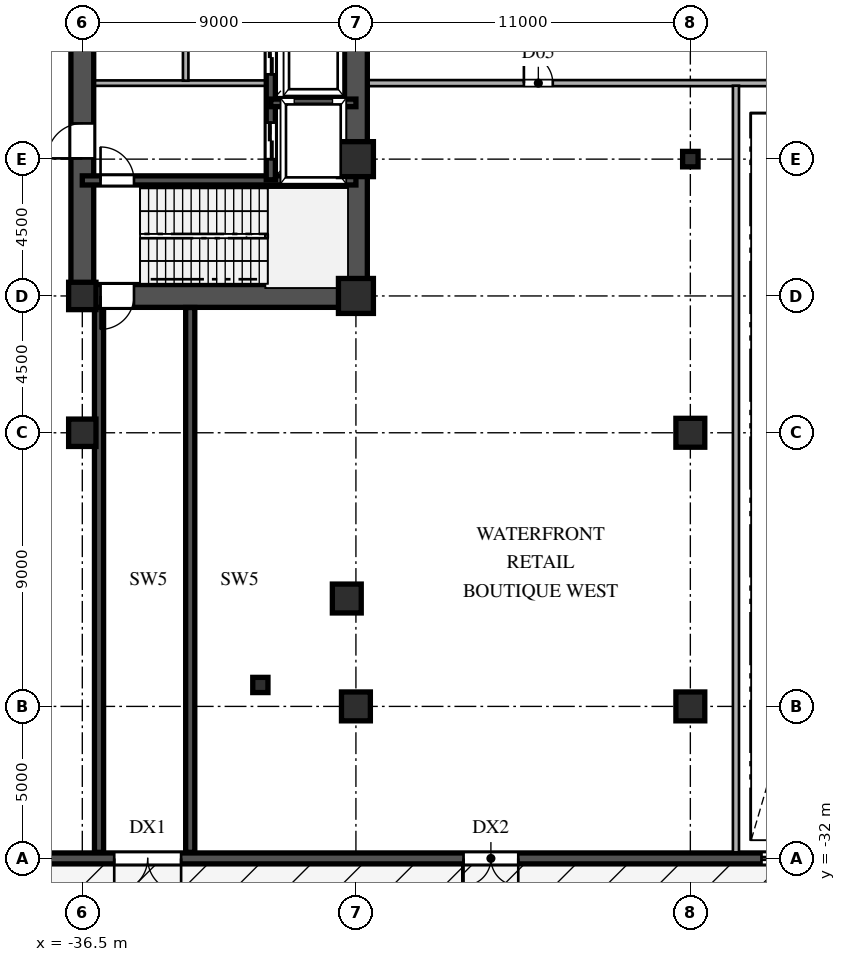
"""IFC4 building model, lengths in metres.
Left out: names, types, materials, properties, quantities, classifications, styles, units other than length and angle.
Written with IfcOpenShell. Run it as: python <this file> out.ifc"""

import sys

from ifc_helpers import new_model, si_unit, direction, frame, frame_2d, origin, origin_2d, place, context, subcontext, project, spatial, rectangle, hollow_rectangle, hollow_circle, i_section, extrude, source, transform, mapped, element, fill, save


model = new_model("IFC4")
c1 = context("Model", 3, precision=1e-05, world=origin(), true_north=direction((0.0, 1.0)))
c2 = subcontext(c1, "Body", "Model", "MODEL_VIEW")
j1 = project(units=[si_unit("LENGTHUNIT", "METRE"), si_unit("PLANEANGLEUNIT", "RADIAN")], contexts=[c1])
p1 = place(None, origin())
s1 = spatial("IfcSite", under=j1, at=p1, CompositionType="ELEMENT")
p2 = place(p1, origin())
s2 = spatial("IfcBuilding", under=s1, at=p2, CompositionType="ELEMENT")
p3 = place(p2, origin())
s3 = spatial("IfcBuildingStorey", under=s2, at=p3, CompositionType="ELEMENT", Elevation=0.0)
m1 = source(origin(), c2, "Body", "SweptSolid", [
    extrude(hollow_rectangle(XDim=1.15, YDim=1.15, WallThickness=0.048, at=origin_2d()), origin(), (0.0, 0.0, 1.0), 5.4),
])
for number, where, z_axis, x_axis in (
    (1, (-27.5, -13.5, 0.0), (0.0, 0.0, 1.0), (1.0, 0.0, 0.0)),
    (2, (-27.5, -9.0, 0.0), (0.0, 0.0, 1.0), (1.0, 0.0, 0.0)),
):
    element("IfcColumn", number, at=place(p3, frame(where, z_axis=z_axis, x_axis=x_axis)), inside=s3, PredefinedType="COLUMN", context=c2, shape_type="MappedRepresentation", body=[
        mapped(m1, transform((0.0, 0.0, 0.0), scale=1.0)),
    ])
m2 = source(origin(), c2, "Body", "SweptSolid", [
    extrude(rectangle(XDim=0.95, YDim=0.95, at=origin_2d()), origin(), (0.0, 0.0, 1.0), 5.4),
])
p4 = place(p3, frame((-27.5, -27.0, 0.0), z_axis=(0.0, 0.0, 1.0), x_axis=(1.0, 0.0, 0.0)))
e3 = element("IfcColumn", 3, at=p4, inside=s3, PredefinedType="COLUMN", context=c2, shape_type="MappedRepresentation", body=[
    mapped(m2, transform((0.0, 0.0, 0.0), scale=1.0)),
])
m3 = source(origin(), c2, "Body", "SweptSolid", [
    extrude(i_section(OverallWidth=0.9, OverallDepth=0.9, WebThickness=0.036, FlangeThickness=0.055, at=origin_2d()), origin(), (0.0, 0.0, 1.0), 5.4),
])
for number, where, z_axis, x_axis in (
    (4, (-36.5, -18.0, 0.0), (0.0, 0.0, 1.0), (1.0, 0.0, 0.0)),
    (5, (-36.5, -13.5, 0.0), (0.0, 0.0, 1.0), (1.0, 0.0, 0.0)),
):
    element("IfcColumn", number, at=place(p3, frame(where, z_axis=z_axis, x_axis=x_axis)), inside=s3, PredefinedType="COLUMN", context=c2, shape_type="MappedRepresentation", body=[
        mapped(m3, transform((0.0, 0.0, 0.0), scale=1.0)),
    ])
m4 = source(origin(), c2, "Body", "SweptSolid", [
    extrude(hollow_rectangle(XDim=0.5, YDim=0.5, WallThickness=0.02, at=origin_2d()), origin(), (0.0, 0.0, 1.0), 5.4),
])
p5 = place(p3, frame((-30.643, -26.295, 0.0), z_axis=(0.0, 0.0, 1.0), x_axis=(1.0, 0.0, 0.0)))
e6 = element("IfcColumn", 6, at=p5, inside=s3, PredefinedType="COLUMN", context=c2, shape_type="MappedRepresentation", body=[
    mapped(m4, transform((0.0, 0.0, 0.0), scale=1.0)),
])
for number, where, z_axis, x_axis in (
    (7, (-27.8, -23.451, 0.0), (0.0, 0.0, 1.0), (1.0, 0.0, 0.0)),
    (8, (-16.5, -27.0, 0.0), (0.0, 0.0, 1.0), (1.0, 0.0, 0.0)),
    (9, (-16.5, -18.0, 0.0), (0.0, 0.0, 1.0), (1.0, 0.0, 0.0)),
):
    element("IfcColumn", number, at=place(p3, frame(where, z_axis=z_axis, x_axis=x_axis)), inside=s3, PredefinedType="COLUMN", context=c2, shape_type="MappedRepresentation", body=[
        mapped(m2, transform((0.0, 0.0, 0.0), scale=1.0)),
    ])
m5 = source(origin(), c2, "Body", "SweptSolid", [
    extrude(hollow_circle(Radius=0.254, WallThickness=0.019, at=origin_2d()), origin(), (0.0, 0.0, 1.0), 5.4),
])
p6 = place(p3, frame((-16.5, -9.0, 0.0), z_axis=(0.0, 0.0, 1.0), x_axis=(1.0, 0.0, 0.0)))
e10 = element("IfcColumn", 10, at=p6, inside=s3, PredefinedType="COLUMN", context=c2, shape_type="MappedRepresentation", body=[
    mapped(m5, transform((0.0, 0.0, 0.0), scale=1.0)),
])
p7 = place(p3, frame((-71.96, -32.0, 0.0), z_axis=(0.0, 0.0, 1.0), x_axis=(1.0, 0.0, 0.0)))
e11 = element("IfcWall", 11, at=p7, inside=s3, PredefinedType="SOLIDWALL", context=c2, shape_type="SweptSolid", body=[
    extrude(rectangle(XDim=143.92, YDim=0.36, at=frame_2d((71.96, 0.0))), origin(), (0.0, 0.0, 1.0), 5.12),
])
p8 = place(p7, frame((18.0, 0.0, 0.0)))
e12 = element("IfcOpeningElement", 12, at=p8, cuts=e11, PredefinedType="OPENING", context=c2, shape_type="SweptSolid", body=[
    extrude(rectangle(XDim=2.2, YDim=2.4, at=frame_2d((1.1, 1.2))), frame((0.0, 0.19, 0.0), z_axis=(0.0, -1.0, 0.0), x_axis=(1.0, 0.0, 0.0)), (0.0, 0.0, 1.0), 0.38),
])
p9 = place(p7, frame((48.0, 0.0, 0.0)))
e13 = element("IfcOpeningElement", 13, at=p9, cuts=e11, PredefinedType="OPENING", context=c2, shape_type="SweptSolid", body=[
    extrude(rectangle(XDim=1.8, YDim=2.4, at=frame_2d((0.9, 1.2))), frame((0.0, 0.19, 0.0), z_axis=(0.0, -1.0, 0.0), x_axis=(1.0, 0.0, 0.0)), (0.0, 0.0, 1.0), 0.38),
])
p10 = place(p7, frame((57.8, 0.0, 0.0)))
e14 = element("IfcOpeningElement", 14, at=p10, cuts=e11, PredefinedType="OPENING", context=c2, shape_type="SweptSolid", body=[
    extrude(rectangle(XDim=6.2, YDim=3.1, at=frame_2d((3.1, 1.55))), frame((0.0, 0.19, 0.0), z_axis=(0.0, -1.0, 0.0), x_axis=(1.0, 0.0, 0.0)), (0.0, 0.0, 1.0), 0.38),
])
p11 = place(p7, frame((70.7, 0.0, 0.0)))
e15 = element("IfcOpeningElement", 15, at=p11, cuts=e11, PredefinedType="OPENING", context=c2, shape_type="SweptSolid", body=[
    extrude(rectangle(XDim=2.2, YDim=2.4, at=frame_2d((1.1, 1.2))), frame((0.0, 0.19, 0.0), z_axis=(0.0, -1.0, 0.0), x_axis=(1.0, 0.0, 0.0)), (0.0, 0.0, 1.0), 0.38),
])
p12 = place(p7, frame((82.2, 0.0, 0.0)))
e16 = element("IfcOpeningElement", 16, at=p12, cuts=e11, PredefinedType="OPENING", context=c2, shape_type="SweptSolid", body=[
    extrude(rectangle(XDim=1.8, YDim=2.4, at=frame_2d((0.9, 1.2))), frame((0.0, 0.19, 0.0), z_axis=(0.0, -1.0, 0.0), x_axis=(1.0, 0.0, 0.0)), (0.0, 0.0, 1.0), 0.38),
])
p13 = place(p7, frame((120.2, 0.0, 0.0)))
e17 = element("IfcOpeningElement", 17, at=p13, cuts=e11, PredefinedType="OPENING", context=c2, shape_type="SweptSolid", body=[
    extrude(rectangle(XDim=2.2, YDim=2.4, at=frame_2d((1.1, 1.2))), frame((0.0, 0.19, 0.0), z_axis=(0.0, -1.0, 0.0), x_axis=(1.0, 0.0, 0.0)), (0.0, 0.0, 1.0), 0.38),
])
p14 = place(p7, frame((36.51, 0.0, 0.0)))
e18 = element("IfcOpeningElement", 18, at=p14, cuts=e11, PredefinedType="OPENING", context=c2, shape_type="SweptSolid", body=[
    extrude(rectangle(XDim=2.2, YDim=2.4, at=frame_2d((1.1, 1.2))), frame((0.0, 0.19, 0.0), z_axis=(0.0, -1.0, 0.0), x_axis=(1.0, 0.0, 0.0)), (0.0, 0.0, 1.0), 0.38),
])
p15 = place(p7, frame((105.21, 0.0, 0.0)))
e19 = element("IfcOpeningElement", 19, at=p15, cuts=e11, PredefinedType="OPENING", context=c2, shape_type="SweptSolid", body=[
    extrude(rectangle(XDim=2.2, YDim=2.4, at=frame_2d((1.1, 1.2))), frame((0.0, 0.19, 0.0), z_axis=(0.0, -1.0, 0.0), x_axis=(1.0, 0.0, 0.0)), (0.0, 0.0, 1.0), 0.38),
])
p16 = place(p7, frame((6.0, 0.0, 0.9)))
e20 = element("IfcOpeningElement", 20, at=p16, cuts=e11, PredefinedType="OPENING", context=c2, shape_type="SweptSolid", body=[
    extrude(rectangle(XDim=2.4, YDim=2.2, at=frame_2d((1.2, 1.1))), frame((0.0, 0.19, 0.0), z_axis=(0.0, -1.0, 0.0), x_axis=(1.0, 0.0, 0.0)), (0.0, 0.0, 1.0), 0.38),
])
p17 = place(p7, frame((12.0, 0.0, 0.9)))
e21 = element("IfcOpeningElement", 21, at=p17, cuts=e11, PredefinedType="OPENING", context=c2, shape_type="SweptSolid", body=[
    extrude(rectangle(XDim=2.4, YDim=2.2, at=frame_2d((1.2, 1.1))), frame((0.0, 0.19, 0.0), z_axis=(0.0, -1.0, 0.0), x_axis=(1.0, 0.0, 0.0)), (0.0, 0.0, 1.0), 0.38),
])
p18 = place(p7, frame((28.0, 0.0, 0.9)))
e22 = element("IfcOpeningElement", 22, at=p18, cuts=e11, PredefinedType="OPENING", context=c2, shape_type="SweptSolid", body=[
    extrude(rectangle(XDim=2.4, YDim=2.2, at=frame_2d((1.2, 1.1))), frame((0.0, 0.19, 0.0), z_axis=(0.0, -1.0, 0.0), x_axis=(1.0, 0.0, 0.0)), (0.0, 0.0, 1.0), 0.38),
])
p19 = place(p7, frame((91.0, 0.0, 0.9)))
e23 = element("IfcOpeningElement", 23, at=p19, cuts=e11, PredefinedType="OPENING", context=c2, shape_type="SweptSolid", body=[
    extrude(rectangle(XDim=2.4, YDim=2.2, at=frame_2d((1.2, 1.1))), frame((0.0, 0.19, 0.0), z_axis=(0.0, -1.0, 0.0), x_axis=(1.0, 0.0, 0.0)), (0.0, 0.0, 1.0), 0.38),
])
p20 = place(p7, frame((102.0, 0.0, 0.9)))
e24 = element("IfcOpeningElement", 24, at=p20, cuts=e11, PredefinedType="OPENING", context=c2, shape_type="SweptSolid", body=[
    extrude(rectangle(XDim=2.4, YDim=2.2, at=frame_2d((1.2, 1.1))), frame((0.0, 0.19, 0.0), z_axis=(0.0, -1.0, 0.0), x_axis=(1.0, 0.0, 0.0)), (0.0, 0.0, 1.0), 0.38),
])
p21 = place(p7, frame((110.0, 0.0, 0.9)))
e25 = element("IfcOpeningElement", 25, at=p21, cuts=e11, PredefinedType="OPENING", context=c2, shape_type="SweptSolid", body=[
    extrude(rectangle(XDim=2.4, YDim=2.2, at=frame_2d((1.2, 1.1))), frame((0.0, 0.19, 0.0), z_axis=(0.0, -1.0, 0.0), x_axis=(1.0, 0.0, 0.0)), (0.0, 0.0, 1.0), 0.38),
])
p22 = place(p7, frame((130.0, 0.0, 0.9)))
e26 = element("IfcOpeningElement", 26, at=p22, cuts=e11, PredefinedType="OPENING", context=c2, shape_type="SweptSolid", body=[
    extrude(rectangle(XDim=2.4, YDim=2.2, at=frame_2d((1.2, 1.1))), frame((0.0, 0.19, 0.0), z_axis=(0.0, -1.0, 0.0), x_axis=(1.0, 0.0, 0.0)), (0.0, 0.0, 1.0), 0.38),
])
p23 = place(p3, frame((-27.5, -13.5, 0.0), z_axis=(0.0, 0.0, 1.0), x_axis=(0.0, 1.0, 0.0)))
e27 = element("IfcWall", 27, at=p23, inside=s3, PredefinedType="SHEAR", context=c2, shape_type="SweptSolid", body=[
    extrude(rectangle(XDim=12.2, YDim=0.75, at=frame_2d((6.1, 0.0))), origin(), (0.0, 0.0, 1.0), 5.12),
])
p24 = place(p3, frame((-36.5, -13.5, 0.0), z_axis=(0.0, 0.0, 1.0), x_axis=(1.0, 0.0, 0.0)))
e28 = element("IfcWall", 28, at=p24, inside=s3, PredefinedType="SHEAR", context=c2, shape_type="SweptSolid", body=[
    extrude(rectangle(XDim=9.0, YDim=0.75, at=frame_2d((4.5, 0.0))), origin(), (0.0, 0.0, 1.0), 5.12),
])
p25 = place(p24, frame((0.6, 0.0, 0.0)))
e29 = element("IfcOpeningElement", 29, at=p25, cuts=e28, PredefinedType="OPENING", context=c2, shape_type="SweptSolid", body=[
    extrude(rectangle(XDim=1.1, YDim=2.2, at=frame_2d((0.55, 1.1))), frame((0.0, 0.385, 0.0), z_axis=(0.0, -1.0, 0.0), x_axis=(1.0, 0.0, 0.0)), (0.0, 0.0, 1.0), 0.77),
])
p26 = place(p3, frame((-36.5, -13.65, 0.0), z_axis=(0.0, 0.0, 1.0), x_axis=(0.0, 1.0, 0.0)))
e30 = element("IfcWall", 30, at=p26, inside=s3, PredefinedType="SHEAR", context=c2, shape_type="SweptSolid", body=[
    extrude(rectangle(XDim=7.15, YDim=0.75, at=frame_2d((3.575, 0.0))), origin(), (0.0, 0.0, 1.0), 5.12),
])
p27 = place(p26, frame((4.675, 0.0, 0.0)))
e31 = element("IfcOpeningElement", 31, at=p27, cuts=e30, PredefinedType="OPENING", context=c2, shape_type="SweptSolid", body=[
    extrude(rectangle(XDim=1.15, YDim=2.2, at=frame_2d((0.575, 1.1))), frame((0.0, 0.385, 0.0), z_axis=(0.0, -1.0, 0.0), x_axis=(1.0, 0.0, 0.0)), (0.0, 0.0, 1.0), 0.77),
])
p28 = place(p3, frame((-36.5, -6.5, 0.0), z_axis=(0.0, 0.0, 1.0), x_axis=(0.0, 1.0, 0.0)))
e32 = element("IfcWall", 32, at=p28, inside=s3, PredefinedType="SHEAR", context=c2, shape_type="SweptSolid", body=[
    extrude(rectangle(XDim=5.2, YDim=0.75, at=frame_2d((2.6, 0.0))), origin(), (0.0, 0.0, 1.0), 5.12),
])
p29 = place(p28, frame((2.125, 0.0, 0.0)))
e33 = element("IfcOpeningElement", 33, at=p29, cuts=e32, PredefinedType="OPENING", context=c2, shape_type="SweptSolid", body=[
    extrude(rectangle(XDim=0.95, YDim=2.15, at=frame_2d((0.475, 1.075))), frame((0.0, 0.385, 0.0), z_axis=(0.0, -1.0, 0.0), x_axis=(1.0, 0.0, 0.0)), (0.0, 0.0, 1.0), 0.77),
])
p30 = place(p3, frame((-36.5, -9.7, 0.0), z_axis=(0.0, 0.0, 1.0), x_axis=(1.0, 0.0, 0.0)))
e34 = element("IfcWall", 34, at=p30, inside=s3, PredefinedType="SHEAR", context=c2, shape_type="SweptSolid", body=[
    extrude(rectangle(XDim=9.0, YDim=0.3, at=frame_2d((4.5, 0.0))), origin(), (0.0, 0.0, 1.0), 5.12),
])
p31 = place(p30, frame((0.6, 0.0, 0.0)))
e35 = element("IfcOpeningElement", 35, at=p31, cuts=e34, PredefinedType="OPENING", context=c2, shape_type="SweptSolid", body=[
    extrude(rectangle(XDim=1.1, YDim=2.2, at=frame_2d((0.55, 1.1))), frame((0.0, 0.16, 0.0), z_axis=(0.0, -1.0, 0.0), x_axis=(1.0, 0.0, 0.0)), (0.0, 0.0, 1.0), 0.32),
])
p32 = place(p3, frame((-30.3, -7.15, 0.0), z_axis=(0.0, 0.0, 1.0), x_axis=(1.0, 0.0, 0.0)))
e36 = element("IfcWall", 36, at=p32, inside=s3, PredefinedType="SHEAR", context=c2, shape_type="SweptSolid", body=[
    extrude(rectangle(XDim=2.8, YDim=0.25, at=frame_2d((1.4, 0.0))), origin(), (0.0, 0.0, 1.0), 5.12),
])
p33 = place(p3, frame((-30.3, -9.68, 0.0), z_axis=(0.0, 0.0, 1.0), x_axis=(0.0, 1.0, 0.0)))
e37 = element("IfcWall", 37, at=p33, inside=s3, PredefinedType="SHEAR", context=c2, shape_type="SweptSolid", body=[
    extrude(rectangle(XDim=2.56, YDim=0.3, at=frame_2d((1.28, 0.0))), origin(), (0.0, 0.0, 1.0), 5.12),
])
p34 = place(p33, frame((0.68, 0.0, 0.0)))
e38 = element("IfcOpeningElement", 38, at=p34, cuts=e37, PredefinedType="OPENING", context=c2, shape_type="SweptSolid", body=[
    extrude(rectangle(XDim=1.2, YDim=2.25, at=frame_2d((0.6, 1.125))), frame((0.0, 0.16, 0.0), z_axis=(0.0, -1.0, 0.0), x_axis=(1.0, 0.0, 0.0)), (0.0, 0.0, 1.0), 0.32),
])
p35 = place(p3, frame((-30.3, -7.12, 0.0), z_axis=(0.0, 0.0, 1.0), x_axis=(0.0, 1.0, 0.0)))
e39 = element("IfcWall", 39, at=p35, inside=s3, PredefinedType="SHEAR", context=c2, shape_type="SweptSolid", body=[
    extrude(rectangle(XDim=2.92, YDim=0.3, at=frame_2d((1.46, 0.0))), origin(), (0.0, 0.0, 1.0), 5.12),
])
p36 = place(p35, frame((0.91, 0.0, 0.0)))
e40 = element("IfcOpeningElement", 40, at=p36, cuts=e39, PredefinedType="OPENING", context=c2, shape_type="SweptSolid", body=[
    extrude(rectangle(XDim=1.1, YDim=2.2, at=frame_2d((0.55, 1.1))), frame((0.0, 0.16, 0.0), z_axis=(0.0, -1.0, 0.0), x_axis=(1.0, 0.0, 0.0)), (0.0, 0.0, 1.0), 0.32),
])
p37 = place(p3, frame((-36.15, -6.5, 0.0), z_axis=(0.0, 0.0, 1.0), x_axis=(1.0, 0.0, 0.0)))
e41 = element("IfcWall", 41, at=p37, inside=s3, PredefinedType="PARTITIONING", context=c2, shape_type="SweptSolid", body=[
    extrude(rectangle(XDim=5.7, YDim=0.18, at=frame_2d((2.85, 0.0))), origin(), (0.0, 0.0, 1.0), 5.12),
])
p38 = place(p3, frame((-33.1, -6.42, 0.0), z_axis=(0.0, 0.0, 1.0), x_axis=(0.0, 1.0, 0.0)))
e42 = element("IfcWall", 42, at=p38, inside=s3, PredefinedType="PARTITIONING", context=c2, shape_type="SweptSolid", body=[
    extrude(rectangle(XDim=5.04, YDim=0.18, at=frame_2d((2.52, 0.0))), origin(), (0.0, 0.0, 1.0), 5.12),
])
p39 = place(p3, frame((-27.12, -6.5, 0.0), z_axis=(0.0, 0.0, 1.0), x_axis=(1.0, 0.0, 0.0)))
e43 = element("IfcWall", 43, at=p39, inside=s3, PredefinedType="PARTITIONING", context=c2, shape_type="SweptSolid", body=[
    extrude(rectangle(XDim=54.24, YDim=0.2, at=frame_2d((27.12, 0.0))), origin(), (0.0, 0.0, 1.0), 5.12),
])
p40 = place(p39, frame((5.145, 0.0, 0.0)))
e44 = element("IfcOpeningElement", 44, at=p40, cuts=e43, PredefinedType="OPENING", context=c2, shape_type="SweptSolid", body=[
    extrude(rectangle(XDim=0.95, YDim=2.15, at=frame_2d((0.475, 1.075))), frame((0.0, 0.11, 0.0), z_axis=(0.0, -1.0, 0.0), x_axis=(1.0, 0.0, 0.0)), (0.0, 0.0, 1.0), 0.22),
])
p41 = place(p39, frame((37.645, 0.0, 0.0)))
e45 = element("IfcOpeningElement", 45, at=p41, cuts=e43, PredefinedType="OPENING", context=c2, shape_type="SweptSolid", body=[
    extrude(rectangle(XDim=0.95, YDim=2.15, at=frame_2d((0.475, 1.075))), frame((0.0, 0.11, 0.0), z_axis=(0.0, -1.0, 0.0), x_axis=(1.0, 0.0, 0.0)), (0.0, 0.0, 1.0), 0.22),
])
for number, where, z_axis, x_axis in (
    (46, (-35.95, -31.8, 0.0), (0.0, 0.0, 1.0), (0.0, 1.0, 0.0)),
    (47, (-32.95, -31.8, 0.0), (0.0, 0.0, 1.0), (0.0, 1.0, 0.0)),
):
    element("IfcWall", number, at=place(p3, frame(where, z_axis=z_axis, x_axis=x_axis)), inside=s3, PredefinedType="SHEAR", context=c2, shape_type="SweptSolid", body=[
        extrude(rectangle(XDim=17.92, YDim=0.3, at=frame_2d((8.96, 0.0))), origin(), (0.0, 0.0, 1.0), 5.12),
    ])
p42 = place(p3, frame((-15.0, -31.8, 0.0), z_axis=(0.0, 0.0, 1.0), x_axis=(0.0, 1.0, 0.0)))
e48 = element("IfcWall", 48, at=p42, inside=s3, PredefinedType="PARTITIONING", context=c2, shape_type="SweptSolid", body=[
    extrude(rectangle(XDim=25.215, YDim=0.2, at=frame_2d((12.607, 0.0))), origin(), (0.0, 0.0, 1.0), 5.12),
])
m6 = source(origin(), c2, "Body", "SweptSolid", [
    extrude(rectangle(XDim=1.8, YDim=2.4, at=frame_2d((0.9, 1.2))), frame((0.0, 0.025, 0.0), z_axis=(0.0, -1.0, 0.0), x_axis=(1.0, 0.0, 0.0)), (0.0, 0.0, 1.0), 0.05),
])
p43 = place(p9, frame((1.8, 0.0, 0.0), z_axis=(0.0, 0.0, 1.0), x_axis=(-1.0, 0.0, 0.0)))
e49 = element("IfcDoor", 49, at=p43, inside=s3, OperationType="DOUBLE_SWING_LEFT", PredefinedType="DOOR", context=c2, shape_type="MappedRepresentation", body=[
    mapped(m6, transform((0.0, 0.0, 0.0), scale=1.0)),
])
fill(e13, e49)
m7 = source(origin(), c2, "Body", "SweptSolid", [
    extrude(rectangle(XDim=6.2, YDim=3.1, at=frame_2d((3.1, 1.55))), frame((0.0, 0.025, 0.0), z_axis=(0.0, -1.0, 0.0), x_axis=(1.0, 0.0, 0.0)), (0.0, 0.0, 1.0), 0.05),
])
p44 = place(p10, frame((6.2, 0.0, 0.0), z_axis=(0.0, 0.0, 1.0), x_axis=(-1.0, 0.0, 0.0)))
e50 = element("IfcDoor", 50, at=p44, inside=s3, OperationType="ROLLINGUP", PredefinedType="GATE", context=c2, shape_type="MappedRepresentation", body=[
    mapped(m7, transform((0.0, 0.0, 0.0), scale=1.0)),
])
fill(e14, e50)
m8 = source(origin(), c2, "Body", "SweptSolid", [
    extrude(rectangle(XDim=2.2, YDim=2.4, at=frame_2d((1.1, 1.2))), frame((0.0, 0.025, 0.0), z_axis=(0.0, -1.0, 0.0), x_axis=(1.0, 0.0, 0.0)), (0.0, 0.0, 1.0), 0.05),
])
p45 = place(p14, frame((2.2, 0.0, 0.0), z_axis=(0.0, 0.0, 1.0), x_axis=(-1.0, 0.0, 0.0)))
e51 = element("IfcDoor", 51, at=p45, inside=s3, OperationType="DOUBLE_SWING_LEFT", PredefinedType="DOOR", context=c2, shape_type="MappedRepresentation", body=[
    mapped(m8, transform((0.0, 0.0, 0.0), scale=1.0)),
])
fill(e18, e51)
m9 = source(origin(), c2, "Body", "SweptSolid", [
    extrude(rectangle(XDim=1.1, YDim=2.2, at=frame_2d((0.55, 1.1))), frame((0.0, 0.025, 0.0), z_axis=(0.0, -1.0, 0.0), x_axis=(1.0, 0.0, 0.0)), (0.0, 0.0, 1.0), 0.05),
])
p46 = place(p25, frame((1.1, 0.0, 0.0), z_axis=(0.0, 0.0, 1.0), x_axis=(-1.0, 0.0, 0.0)))
e52 = element("IfcDoor", 52, at=p46, inside=s3, OperationType="SINGLE_SWING_LEFT", PredefinedType="DOOR", context=c2, shape_type="MappedRepresentation", body=[
    mapped(m9, transform((0.0, 0.0, 0.0), scale=1.0)),
])
fill(e29, e52)
m10 = source(origin(), c2, "Body", "SweptSolid", [
    extrude(rectangle(XDim=1.15, YDim=2.2, at=frame_2d((0.575, 1.1))), frame((0.0, 0.025, 0.0), z_axis=(0.0, -1.0, 0.0), x_axis=(1.0, 0.0, 0.0)), (0.0, 0.0, 1.0), 0.05),
])
p47 = place(p27, origin())
e53 = element("IfcDoor", 53, at=p47, inside=s3, OperationType="SINGLE_SWING_LEFT", PredefinedType="DOOR", context=c2, shape_type="MappedRepresentation", body=[
    mapped(m10, transform((0.0, 0.0, 0.0), scale=1.0)),
])
fill(e31, e53)
p48 = place(p31, origin())
e54 = element("IfcDoor", 54, at=p48, inside=s3, OperationType="SINGLE_SWING_LEFT", PredefinedType="DOOR", context=c2, shape_type="MappedRepresentation", body=[
    mapped(m9, transform((0.0, 0.0, 0.0), scale=1.0)),
])
fill(e35, e54)
m11 = source(origin(), c2, "Body", "SweptSolid", [
    extrude(rectangle(XDim=1.2, YDim=2.25, at=frame_2d((0.6, 1.125))), frame((0.0, 0.025, 0.0), z_axis=(0.0, -1.0, 0.0), x_axis=(1.0, 0.0, 0.0)), (0.0, 0.0, 1.0), 0.05),
])
p49 = place(p34, origin())
e55 = element("IfcDoor", 55, at=p49, inside=s3, OperationType="DOUBLE_DOOR_SLIDING", PredefinedType="DOOR", context=c2, shape_type="MappedRepresentation", body=[
    mapped(m11, transform((0.0, 0.0, 0.0), scale=1.0)),
])
fill(e38, e55)
m12 = source(origin(), c2, "Body", "SweptSolid", [
    extrude(rectangle(XDim=1.1, YDim=2.2, at=frame_2d((0.55, 1.1))), frame((0.0, 0.025, 0.0), z_axis=(0.0, -1.0, 0.0), x_axis=(1.0, 0.0, 0.0)), (0.0, 0.0, 1.0), 0.05),
])
p50 = place(p36, origin())
e56 = element("IfcDoor", 56, at=p50, inside=s3, OperationType="DOUBLE_DOOR_SLIDING", PredefinedType="DOOR", context=c2, shape_type="MappedRepresentation", body=[
    mapped(m12, transform((0.0, 0.0, 0.0), scale=1.0)),
])
fill(e40, e56)
m13 = source(origin(), c2, "Body", "SweptSolid", [
    extrude(rectangle(XDim=0.95, YDim=2.15, at=frame_2d((0.475, 1.075))), frame((0.0, 0.025, 0.0), z_axis=(0.0, -1.0, 0.0), x_axis=(1.0, 0.0, 0.0)), (0.0, 0.0, 1.0), 0.05),
])
p51 = place(p40, origin())
e57 = element("IfcDoor", 57, at=p51, inside=s3, OperationType="SINGLE_SWING_LEFT", PredefinedType="DOOR", context=c2, shape_type="MappedRepresentation", body=[
    mapped(m13, transform((0.0, 0.0, 0.0), scale=1.0)),
])
fill(e44, e57)
save(model, sys.argv[1])
